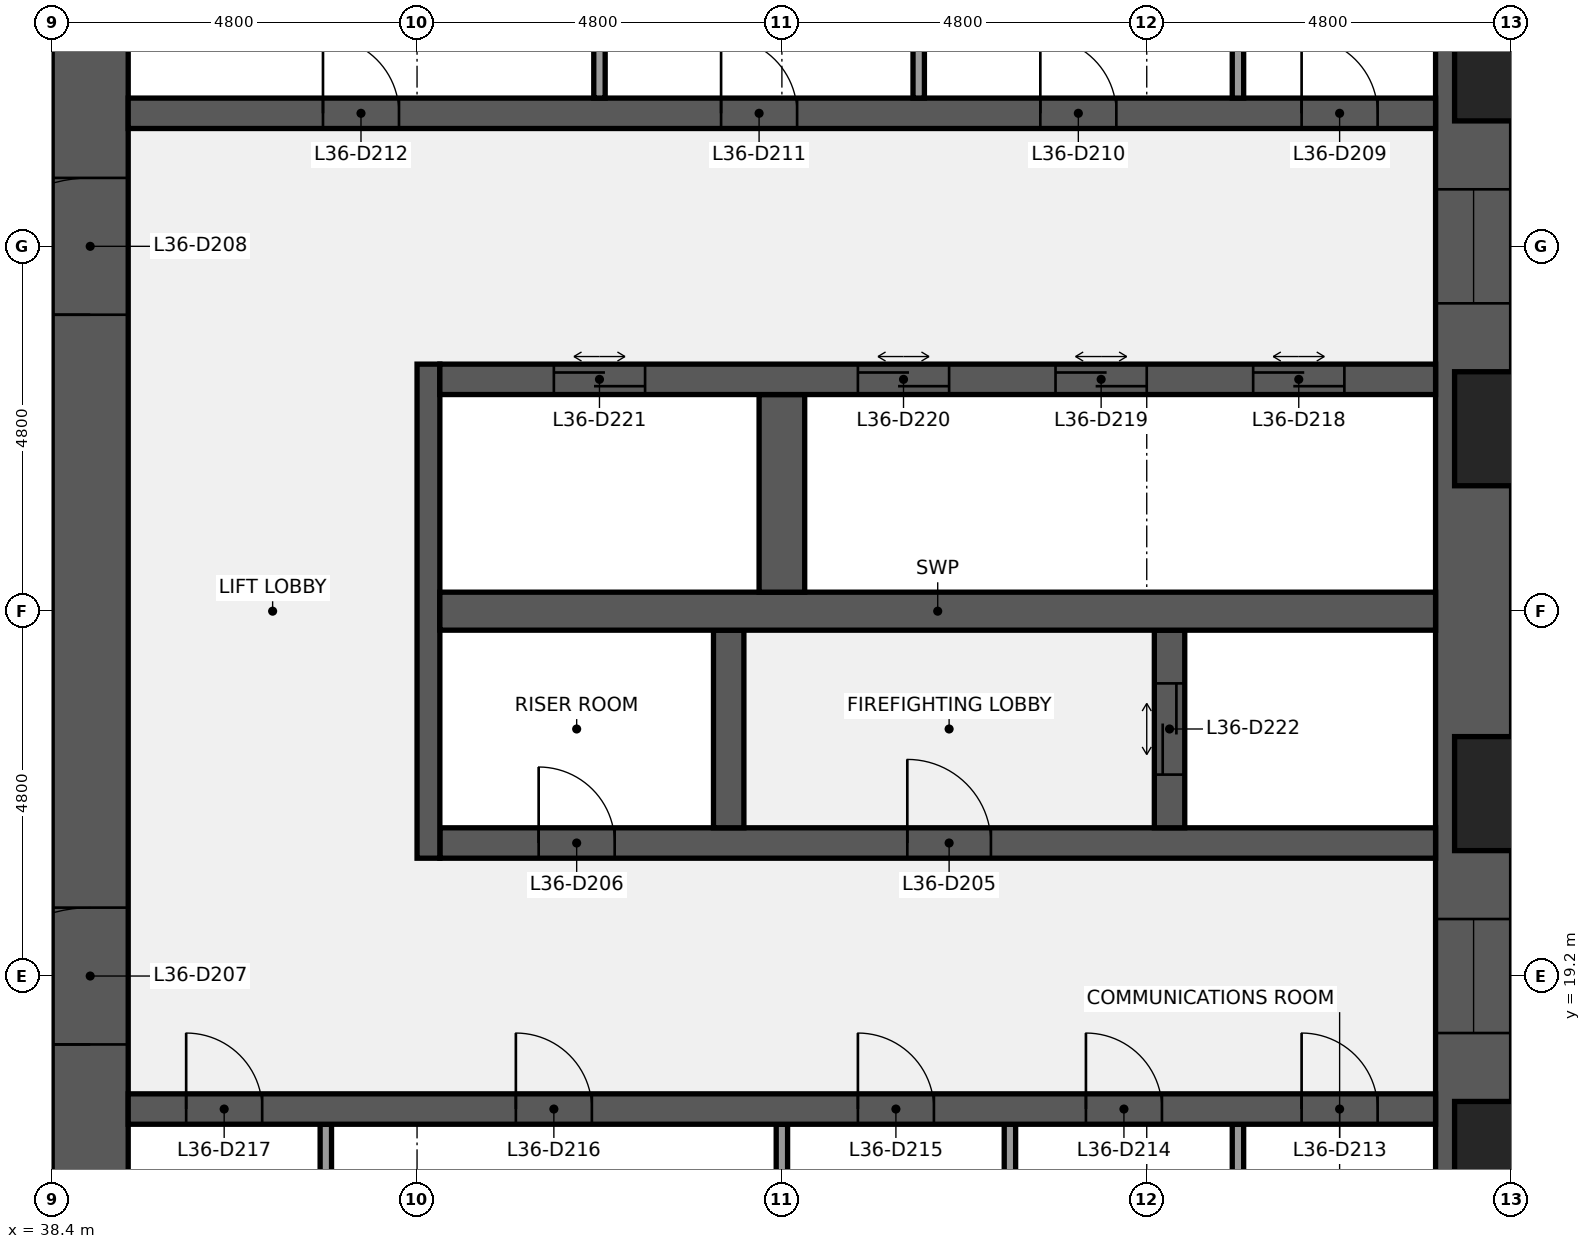
"""IFC4 building model, lengths in metres.
Left out: names, types, materials, properties, quantities, classifications, styles, units other than length and angle.
Written with IfcOpenShell. Run it as: python <this file> out.ifc"""

import sys

from ifc_helpers import new_model, si_unit, direction, frame, frame_2d, origin, place, context, subcontext, project, spatial, rectangle, extrude, element, fill, save


model = new_model("IFC4")
c1 = context("Model", 3, precision=1e-05, world=origin(), true_north=direction((0.0, 1.0)))
c2 = subcontext(c1, "Body", "Model", "MODEL_VIEW")
j1 = project(units=[si_unit("LENGTHUNIT", "METRE"), si_unit("PLANEANGLEUNIT", "RADIAN")], contexts=[c1])
p1 = place(None, origin())
s1 = spatial("IfcSite", under=j1, at=p1, CompositionType="ELEMENT")
p2 = place(p1, origin())
s2 = spatial("IfcBuilding", under=s1, at=p2, CompositionType="ELEMENT")
p3 = place(p2, frame((0.0, 0.0, 164.1)))
s3 = spatial("IfcBuildingStorey", under=s2, at=p3, CompositionType="ELEMENT", Elevation=164.1)
p4 = place(p3, frame((57.1, 38.4, 0.0), z_axis=(0.0, 0.0, 1.0), x_axis=(0.0, -1.0, 0.0)))
e1 = element("IfcWall", 1, at=p4, inside=s3, PredefinedType="SHEAR", context=c2, shape_type="SweptSolid", body=[
    extrude(rectangle(XDim=28.8, YDim=1.0, at=frame_2d((14.4, 0.0))), origin(), (0.0, 0.0, 1.0), 3.84),
])
p5 = place(p4, frame((18.45, 0.0, 0.9)))
e2 = element("IfcOpeningElement", 2, at=p5, cuts=e1, PredefinedType="OPENING", context=c2, shape_type="SweptSolid", body=[
    extrude(rectangle(XDim=1.5, YDim=1.5, at=frame_2d((0.75, 0.75))), frame((0.0, 0.51, 0.0), z_axis=(0.0, -1.0, 0.0), x_axis=(1.0, 0.0, 0.0)), (0.0, 0.0, 1.0), 1.02),
])
p6 = place(p4, frame((8.85, 0.0, 0.9)))
e3 = element("IfcOpeningElement", 3, at=p6, cuts=e1, PredefinedType="OPENING", context=c2, shape_type="SweptSolid", body=[
    extrude(rectangle(XDim=1.5, YDim=1.5, at=frame_2d((0.75, 0.75))), frame((0.0, 0.51, 0.0), z_axis=(0.0, -1.0, 0.0), x_axis=(1.0, 0.0, 0.0)), (0.0, 0.0, 1.0), 1.02),
])
p7 = place(p3, frame((38.9, 9.6, 0.0), z_axis=(0.0, 0.0, 1.0), x_axis=(0.0, 1.0, 0.0)))
e4 = element("IfcWall", 4, at=p7, inside=s3, PredefinedType="SHEAR", context=c2, shape_type="SweptSolid", body=[
    extrude(rectangle(XDim=28.8, YDim=1.0, at=frame_2d((14.4, 0.0))), origin(), (0.0, 0.0, 1.0), 3.84),
])
p8 = place(p7, frame((8.7, 0.0, 0.0)))
e5 = element("IfcOpeningElement", 5, at=p8, cuts=e4, PredefinedType="OPENING", context=c2, shape_type="SweptSolid", body=[
    extrude(rectangle(XDim=1.8, YDim=2.1, at=frame_2d((0.9, 1.05))), frame((0.0, 0.51, 0.0), z_axis=(0.0, -1.0, 0.0), x_axis=(1.0, 0.0, 0.0)), (0.0, 0.0, 1.0), 1.02),
])
p9 = place(p7, frame((18.3, 0.0, 0.0)))
e6 = element("IfcOpeningElement", 6, at=p9, cuts=e4, PredefinedType="OPENING", context=c2, shape_type="SweptSolid", body=[
    extrude(rectangle(XDim=1.8, YDim=2.1, at=frame_2d((0.9, 1.05))), frame((0.0, 0.51, 0.0), z_axis=(0.0, -1.0, 0.0), x_axis=(1.0, 0.0, 0.0)), (0.0, 0.0, 1.0), 1.02),
])
for number, where, z_axis, x_axis in (
    (7, (54.0, 14.65, 0.0), (0.0, 0.0, 1.0), (0.0, 1.0, 0.0)),
    (8, (51.0, 14.65, 0.0), (0.0, 0.0, 1.0), (0.0, 1.0, 0.0)),
    (9, (48.0, 14.65, 0.0), (0.0, 0.0, 1.0), (0.0, 1.0, 0.0)),
    (10, (42.0, 14.65, 0.0), (0.0, 0.0, 1.0), (0.0, 1.0, 0.0)),
):
    element("IfcWall", number, at=place(p3, frame(where, z_axis=z_axis, x_axis=x_axis)), inside=s3, PredefinedType="PARTITIONING", context=c2, shape_type="SweptSolid", body=[
        extrude(rectangle(XDim=2.6, YDim=0.15, at=frame_2d((1.3, 0.0))), origin(), (0.0, 0.0, 1.0), 3.84),
    ])
p10 = place(p3, frame((39.4, 17.45, 0.0), z_axis=(0.0, 0.0, 1.0), x_axis=(1.0, 0.0, 0.0)))
e11 = element("IfcWall", 11, at=p10, inside=s3, PredefinedType="SHEAR", context=c2, shape_type="SweptSolid", body=[
    extrude(rectangle(XDim=17.2, YDim=0.4, at=frame_2d((8.6, 0.0))), origin(), (0.0, 0.0, 1.0), 3.84),
])
p11 = place(p10, frame((15.438, 0.0, 0.0)))
e12 = element("IfcOpeningElement", 12, at=p11, cuts=e11, PredefinedType="OPENING", context=c2, shape_type="SweptSolid", body=[
    extrude(rectangle(XDim=1.0, YDim=2.1, at=frame_2d((0.5, 1.05))), frame((0.0, 0.21, 0.0), z_axis=(0.0, -1.0, 0.0), x_axis=(1.0, 0.0, 0.0)), (0.0, 0.0, 1.0), 0.42),
])
p12 = place(p10, frame((12.6, 0.0, 0.0)))
e13 = element("IfcOpeningElement", 13, at=p12, cuts=e11, PredefinedType="OPENING", context=c2, shape_type="SweptSolid", body=[
    extrude(rectangle(XDim=1.0, YDim=2.1, at=frame_2d((0.5, 1.05))), frame((0.0, 0.21, 0.0), z_axis=(0.0, -1.0, 0.0), x_axis=(1.0, 0.0, 0.0)), (0.0, 0.0, 1.0), 0.42),
])
p13 = place(p10, frame((9.6, 0.0, 0.0)))
e14 = element("IfcOpeningElement", 14, at=p13, cuts=e11, PredefinedType="OPENING", context=c2, shape_type="SweptSolid", body=[
    extrude(rectangle(XDim=1.0, YDim=2.1, at=frame_2d((0.5, 1.05))), frame((0.0, 0.21, 0.0), z_axis=(0.0, -1.0, 0.0), x_axis=(1.0, 0.0, 0.0)), (0.0, 0.0, 1.0), 0.42),
])
p14 = place(p10, frame((5.1, 0.0, 0.0)))
e15 = element("IfcOpeningElement", 15, at=p14, cuts=e11, PredefinedType="OPENING", context=c2, shape_type="SweptSolid", body=[
    extrude(rectangle(XDim=1.0, YDim=2.1, at=frame_2d((0.5, 1.05))), frame((0.0, 0.21, 0.0), z_axis=(0.0, -1.0, 0.0), x_axis=(1.0, 0.0, 0.0)), (0.0, 0.0, 1.0), 0.42),
])
p15 = place(p10, frame((0.762, 0.0, 0.0)))
e16 = element("IfcOpeningElement", 16, at=p15, cuts=e11, PredefinedType="OPENING", context=c2, shape_type="SweptSolid", body=[
    extrude(rectangle(XDim=1.0, YDim=2.1, at=frame_2d((0.5, 1.05))), frame((0.0, 0.21, 0.0), z_axis=(0.0, -1.0, 0.0), x_axis=(1.0, 0.0, 0.0)), (0.0, 0.0, 1.0), 0.42),
])
p16 = place(p3, frame((43.5, 20.95, 0.0), z_axis=(0.0, 0.0, 1.0), x_axis=(1.0, 0.0, 0.0)))
e17 = element("IfcWall", 17, at=p16, inside=s3, PredefinedType="SHEAR", context=c2, shape_type="SweptSolid", body=[
    extrude(rectangle(XDim=13.1, YDim=0.4, at=frame_2d((6.55, 0.0))), origin(), (0.0, 0.0, 1.0), 3.84),
])
p17 = place(p16, frame((6.15, 0.0, 0.0)))
e18 = element("IfcOpeningElement", 18, at=p17, cuts=e17, PredefinedType="OPENING", context=c2, shape_type="SweptSolid", body=[
    extrude(rectangle(XDim=1.1, YDim=2.1, at=frame_2d((0.55, 1.05))), frame((0.0, 0.21, 0.0), z_axis=(0.0, -1.0, 0.0), x_axis=(1.0, 0.0, 0.0)), (0.0, 0.0, 1.0), 0.42),
])
p18 = place(p16, frame((1.3, 0.0, 0.0)))
e19 = element("IfcOpeningElement", 19, at=p18, cuts=e17, PredefinedType="OPENING", context=c2, shape_type="SweptSolid", body=[
    extrude(rectangle(XDim=1.0, YDim=2.1, at=frame_2d((0.5, 1.05))), frame((0.0, 0.21, 0.0), z_axis=(0.0, -1.0, 0.0), x_axis=(1.0, 0.0, 0.0)), (0.0, 0.0, 1.0), 0.42),
])
p19 = place(p3, frame((43.35, 20.75, 0.0), z_axis=(0.0, 0.0, 1.0), x_axis=(0.0, 1.0, 0.0)))
e20 = element("IfcWall", 20, at=p19, inside=s3, PredefinedType="SHEAR", context=c2, shape_type="SweptSolid", body=[
    extrude(rectangle(XDim=6.5, YDim=0.3, at=frame_2d((3.25, 0.0))), origin(), (0.0, 0.0, 1.0), 3.84),
])
p20 = place(p3, frame((53.1, 21.15, 0.0), z_axis=(0.0, 0.0, 1.0), x_axis=(0.0, 1.0, 0.0)))
e21 = element("IfcWall", 21, at=p20, inside=s3, PredefinedType="SHEAR", context=c2, shape_type="SweptSolid", body=[
    extrude(rectangle(XDim=2.6, YDim=0.4, at=frame_2d((1.3, 0.0))), origin(), (0.0, 0.0, 1.0), 3.84),
])
p21 = place(p20, frame((0.7, 0.0, 0.0)))
e22 = element("IfcOpeningElement", 22, at=p21, cuts=e21, PredefinedType="OPENING", context=c2, shape_type="SweptSolid", body=[
    extrude(rectangle(XDim=1.2, YDim=2.1, at=frame_2d((0.6, 1.05))), frame((0.0, 0.21, 0.0), z_axis=(0.0, -1.0, 0.0), x_axis=(1.0, 0.0, 0.0)), (0.0, 0.0, 1.0), 0.42),
])
p22 = place(p3, frame((47.3, 21.15, 0.0), z_axis=(0.0, 0.0, 1.0), x_axis=(0.0, 1.0, 0.0)))
e23 = element("IfcWall", 23, at=p22, inside=s3, PredefinedType="SHEAR", context=c2, shape_type="SweptSolid", body=[
    extrude(rectangle(XDim=2.6, YDim=0.4, at=frame_2d((1.3, 0.0))), origin(), (0.0, 0.0, 1.0), 3.84),
])
p23 = place(p3, frame((43.5, 24.0, 0.0), z_axis=(0.0, 0.0, 1.0), x_axis=(1.0, 0.0, 0.0)))
e24 = element("IfcWall", 24, at=p23, inside=s3, PredefinedType="SHEAR", context=c2, shape_type="SweptSolid", body=[
    extrude(rectangle(XDim=13.1, YDim=0.5, at=frame_2d((6.55, 0.0))), origin(), (0.0, 0.0, 1.0), 3.84),
])
p24 = place(p3, frame((48.0, 24.25, 0.0), z_axis=(0.0, 0.0, 1.0), x_axis=(0.0, 1.0, 0.0)))
e25 = element("IfcWall", 25, at=p24, inside=s3, PredefinedType="SHEAR", context=c2, shape_type="SweptSolid", body=[
    extrude(rectangle(XDim=2.6, YDim=0.6, at=frame_2d((1.3, 0.0))), origin(), (0.0, 0.0, 1.0), 3.84),
])
p25 = place(p3, frame((43.5, 27.05, 0.0), z_axis=(0.0, 0.0, 1.0), x_axis=(1.0, 0.0, 0.0)))
e26 = element("IfcWall", 26, at=p25, inside=s3, PredefinedType="SHEAR", context=c2, shape_type="SweptSolid", body=[
    extrude(rectangle(XDim=13.1, YDim=0.4, at=frame_2d((6.55, 0.0))), origin(), (0.0, 0.0, 1.0), 3.84),
])
p26 = place(p25, frame((10.7, 0.0, 0.0)))
e27 = element("IfcOpeningElement", 27, at=p26, cuts=e26, PredefinedType="OPENING", context=c2, shape_type="SweptSolid", body=[
    extrude(rectangle(XDim=1.2, YDim=2.1, at=frame_2d((0.6, 1.05))), frame((0.0, 0.21, 0.0), z_axis=(0.0, -1.0, 0.0), x_axis=(1.0, 0.0, 0.0)), (0.0, 0.0, 1.0), 0.42),
])
p27 = place(p25, frame((8.1, 0.0, 0.0)))
e28 = element("IfcOpeningElement", 28, at=p27, cuts=e26, PredefinedType="OPENING", context=c2, shape_type="SweptSolid", body=[
    extrude(rectangle(XDim=1.2, YDim=2.1, at=frame_2d((0.6, 1.05))), frame((0.0, 0.21, 0.0), z_axis=(0.0, -1.0, 0.0), x_axis=(1.0, 0.0, 0.0)), (0.0, 0.0, 1.0), 0.42),
])
p28 = place(p25, frame((5.5, 0.0, 0.0)))
e29 = element("IfcOpeningElement", 29, at=p28, cuts=e26, PredefinedType="OPENING", context=c2, shape_type="SweptSolid", body=[
    extrude(rectangle(XDim=1.2, YDim=2.1, at=frame_2d((0.6, 1.05))), frame((0.0, 0.21, 0.0), z_axis=(0.0, -1.0, 0.0), x_axis=(1.0, 0.0, 0.0)), (0.0, 0.0, 1.0), 0.42),
])
p29 = place(p25, frame((1.5, 0.0, 0.0)))
e30 = element("IfcOpeningElement", 30, at=p29, cuts=e26, PredefinedType="OPENING", context=c2, shape_type="SweptSolid", body=[
    extrude(rectangle(XDim=1.2, YDim=2.1, at=frame_2d((0.6, 1.05))), frame((0.0, 0.21, 0.0), z_axis=(0.0, -1.0, 0.0), x_axis=(1.0, 0.0, 0.0)), (0.0, 0.0, 1.0), 0.42),
])
p30 = place(p3, frame((39.4, 30.55, 0.0), z_axis=(0.0, 0.0, 1.0), x_axis=(1.0, 0.0, 0.0)))
e31 = element("IfcWall", 31, at=p30, inside=s3, PredefinedType="SHEAR", context=c2, shape_type="SweptSolid", body=[
    extrude(rectangle(XDim=17.2, YDim=0.4, at=frame_2d((8.6, 0.0))), origin(), (0.0, 0.0, 1.0), 3.84),
])
p31 = place(p30, frame((15.438, 0.0, 0.0)))
e32 = element("IfcOpeningElement", 32, at=p31, cuts=e31, PredefinedType="OPENING", context=c2, shape_type="SweptSolid", body=[
    extrude(rectangle(XDim=1.0, YDim=2.1, at=frame_2d((0.5, 1.05))), frame((0.0, 0.21, 0.0), z_axis=(0.0, -1.0, 0.0), x_axis=(1.0, 0.0, 0.0)), (0.0, 0.0, 1.0), 0.42),
])
p32 = place(p30, frame((12.0, 0.0, 0.0)))
e33 = element("IfcOpeningElement", 33, at=p32, cuts=e31, PredefinedType="OPENING", context=c2, shape_type="SweptSolid", body=[
    extrude(rectangle(XDim=1.0, YDim=2.1, at=frame_2d((0.5, 1.05))), frame((0.0, 0.21, 0.0), z_axis=(0.0, -1.0, 0.0), x_axis=(1.0, 0.0, 0.0)), (0.0, 0.0, 1.0), 0.42),
])
p33 = place(p30, frame((7.8, 0.0, 0.0)))
e34 = element("IfcOpeningElement", 34, at=p33, cuts=e31, PredefinedType="OPENING", context=c2, shape_type="SweptSolid", body=[
    extrude(rectangle(XDim=1.0, YDim=2.1, at=frame_2d((0.5, 1.05))), frame((0.0, 0.21, 0.0), z_axis=(0.0, -1.0, 0.0), x_axis=(1.0, 0.0, 0.0)), (0.0, 0.0, 1.0), 0.42),
])
p34 = place(p30, frame((2.562, 0.0, 0.0)))
e35 = element("IfcOpeningElement", 35, at=p34, cuts=e31, PredefinedType="OPENING", context=c2, shape_type="SweptSolid", body=[
    extrude(rectangle(XDim=1.0, YDim=2.1, at=frame_2d((0.5, 1.05))), frame((0.0, 0.21, 0.0), z_axis=(0.0, -1.0, 0.0), x_axis=(1.0, 0.0, 0.0)), (0.0, 0.0, 1.0), 0.42),
])
for number, where, z_axis, x_axis in (
    (36, (54.0, 30.75, 0.0), (0.0, 0.0, 1.0), (0.0, 1.0, 0.0)),
    (37, (49.8, 30.75, 0.0), (0.0, 0.0, 1.0), (0.0, 1.0, 0.0)),
    (38, (45.6, 30.75, 0.0), (0.0, 0.0, 1.0), (0.0, 1.0, 0.0)),
):
    element("IfcWall", number, at=place(p3, frame(where, z_axis=z_axis, x_axis=x_axis)), inside=s3, PredefinedType="PARTITIONING", context=c2, shape_type="SweptSolid", body=[
        extrude(rectangle(XDim=2.6, YDim=0.15, at=frame_2d((1.3, 0.0))), origin(), (0.0, 0.0, 1.0), 3.84),
    ])
p35 = place(p17, origin())
e39 = element("IfcDoor", 39, at=p35, inside=s3, OperationType="SINGLE_SWING_LEFT", PredefinedType="DOOR", context=c2, shape_type="SweptSolid", body=[
    extrude(rectangle(XDim=1.1, YDim=2.1, at=frame_2d((0.55, 1.05))), frame((0.0, 0.025, 0.0), z_axis=(0.0, -1.0, 0.0), x_axis=(1.0, 0.0, 0.0)), (0.0, 0.0, 1.0), 0.05),
])
fill(e18, e39)
p36 = place(p18, origin())
e40 = element("IfcDoor", 40, at=p36, inside=s3, OperationType="SINGLE_SWING_LEFT", PredefinedType="DOOR", context=c2, shape_type="SweptSolid", body=[
    extrude(rectangle(XDim=1.0, YDim=2.1, at=frame_2d((0.5, 1.05))), frame((0.0, 0.025, 0.0), z_axis=(0.0, -1.0, 0.0), x_axis=(1.0, 0.0, 0.0)), (0.0, 0.0, 1.0), 0.05),
])
fill(e19, e40)
p37 = place(p8, origin())
e41 = element("IfcDoor", 41, at=p37, inside=s3, OperationType="DOUBLE_DOOR_SINGLE_SWING", PredefinedType="DOOR", context=c2, shape_type="SweptSolid", body=[
    extrude(rectangle(XDim=1.8, YDim=2.1, at=frame_2d((0.9, 1.05))), frame((0.0, 0.025, 0.0), z_axis=(0.0, -1.0, 0.0), x_axis=(1.0, 0.0, 0.0)), (0.0, 0.0, 1.0), 0.05),
])
fill(e5, e41)
p38 = place(p9, origin())
e42 = element("IfcDoor", 42, at=p38, inside=s3, OperationType="DOUBLE_DOOR_SINGLE_SWING", PredefinedType="DOOR", context=c2, shape_type="SweptSolid", body=[
    extrude(rectangle(XDim=1.8, YDim=2.1, at=frame_2d((0.9, 1.05))), frame((0.0, 0.025, 0.0), z_axis=(0.0, -1.0, 0.0), x_axis=(1.0, 0.0, 0.0)), (0.0, 0.0, 1.0), 0.05),
])
fill(e6, e42)
p39 = place(p31, origin())
e43 = element("IfcDoor", 43, at=p39, inside=s3, OperationType="SINGLE_SWING_LEFT", PredefinedType="DOOR", context=c2, shape_type="SweptSolid", body=[
    extrude(rectangle(XDim=1.0, YDim=2.1, at=frame_2d((0.5, 1.05))), frame((0.0, 0.025, 0.0), z_axis=(0.0, -1.0, 0.0), x_axis=(1.0, 0.0, 0.0)), (0.0, 0.0, 1.0), 0.05),
])
fill(e32, e43)
p40 = place(p32, origin())
e44 = element("IfcDoor", 44, at=p40, inside=s3, OperationType="SINGLE_SWING_LEFT", PredefinedType="DOOR", context=c2, shape_type="SweptSolid", body=[
    extrude(rectangle(XDim=1.0, YDim=2.1, at=frame_2d((0.5, 1.05))), frame((0.0, 0.025, 0.0), z_axis=(0.0, -1.0, 0.0), x_axis=(1.0, 0.0, 0.0)), (0.0, 0.0, 1.0), 0.05),
])
fill(e33, e44)
p41 = place(p33, origin())
e45 = element("IfcDoor", 45, at=p41, inside=s3, OperationType="SINGLE_SWING_LEFT", PredefinedType="DOOR", context=c2, shape_type="SweptSolid", body=[
    extrude(rectangle(XDim=1.0, YDim=2.1, at=frame_2d((0.5, 1.05))), frame((0.0, 0.025, 0.0), z_axis=(0.0, -1.0, 0.0), x_axis=(1.0, 0.0, 0.0)), (0.0, 0.0, 1.0), 0.05),
])
fill(e34, e45)
p42 = place(p34, origin())
e46 = element("IfcDoor", 46, at=p42, inside=s3, OperationType="SINGLE_SWING_LEFT", PredefinedType="DOOR", context=c2, shape_type="SweptSolid", body=[
    extrude(rectangle(XDim=1.0, YDim=2.1, at=frame_2d((0.5, 1.05))), frame((0.0, 0.025, 0.0), z_axis=(0.0, -1.0, 0.0), x_axis=(1.0, 0.0, 0.0)), (0.0, 0.0, 1.0), 0.05),
])
fill(e35, e46)
p43 = place(p11, origin())
e47 = element("IfcDoor", 47, at=p43, inside=s3, OperationType="SINGLE_SWING_LEFT", PredefinedType="DOOR", context=c2, shape_type="SweptSolid", body=[
    extrude(rectangle(XDim=1.0, YDim=2.1, at=frame_2d((0.5, 1.05))), frame((0.0, 0.025, 0.0), z_axis=(0.0, -1.0, 0.0), x_axis=(1.0, 0.0, 0.0)), (0.0, 0.0, 1.0), 0.05),
])
fill(e12, e47)
p44 = place(p12, origin())
e48 = element("IfcDoor", 48, at=p44, inside=s3, OperationType="SINGLE_SWING_LEFT", PredefinedType="DOOR", context=c2, shape_type="SweptSolid", body=[
    extrude(rectangle(XDim=1.0, YDim=2.1, at=frame_2d((0.5, 1.05))), frame((0.0, 0.025, 0.0), z_axis=(0.0, -1.0, 0.0), x_axis=(1.0, 0.0, 0.0)), (0.0, 0.0, 1.0), 0.05),
])
fill(e13, e48)
p45 = place(p13, origin())
e49 = element("IfcDoor", 49, at=p45, inside=s3, OperationType="SINGLE_SWING_LEFT", PredefinedType="DOOR", context=c2, shape_type="SweptSolid", body=[
    extrude(rectangle(XDim=1.0, YDim=2.1, at=frame_2d((0.5, 1.05))), frame((0.0, 0.025, 0.0), z_axis=(0.0, -1.0, 0.0), x_axis=(1.0, 0.0, 0.0)), (0.0, 0.0, 1.0), 0.05),
])
fill(e14, e49)
p46 = place(p14, origin())
e50 = element("IfcDoor", 50, at=p46, inside=s3, OperationType="SINGLE_SWING_LEFT", PredefinedType="DOOR", context=c2, shape_type="SweptSolid", body=[
    extrude(rectangle(XDim=1.0, YDim=2.1, at=frame_2d((0.5, 1.05))), frame((0.0, 0.025, 0.0), z_axis=(0.0, -1.0, 0.0), x_axis=(1.0, 0.0, 0.0)), (0.0, 0.0, 1.0), 0.05),
])
fill(e15, e50)
p47 = place(p15, origin())
e51 = element("IfcDoor", 51, at=p47, inside=s3, OperationType="SINGLE_SWING_LEFT", PredefinedType="DOOR", context=c2, shape_type="SweptSolid", body=[
    extrude(rectangle(XDim=1.0, YDim=2.1, at=frame_2d((0.5, 1.05))), frame((0.0, 0.025, 0.0), z_axis=(0.0, -1.0, 0.0), x_axis=(1.0, 0.0, 0.0)), (0.0, 0.0, 1.0), 0.05),
])
fill(e16, e51)
p48 = place(p26, origin())
e52 = element("IfcDoor", 52, at=p48, inside=s3, OperationType="DOUBLE_DOOR_SLIDING", PredefinedType="DOOR", context=c2, shape_type="SweptSolid", body=[
    extrude(rectangle(XDim=1.2, YDim=2.1, at=frame_2d((0.6, 1.05))), frame((0.0, 0.025, 0.0), z_axis=(0.0, -1.0, 0.0), x_axis=(1.0, 0.0, 0.0)), (0.0, 0.0, 1.0), 0.05),
])
fill(e27, e52)
p49 = place(p27, origin())
e53 = element("IfcDoor", 53, at=p49, inside=s3, OperationType="DOUBLE_DOOR_SLIDING", PredefinedType="DOOR", context=c2, shape_type="SweptSolid", body=[
    extrude(rectangle(XDim=1.2, YDim=2.1, at=frame_2d((0.6, 1.05))), frame((0.0, 0.025, 0.0), z_axis=(0.0, -1.0, 0.0), x_axis=(1.0, 0.0, 0.0)), (0.0, 0.0, 1.0), 0.05),
])
fill(e28, e53)
p50 = place(p28, origin())
e54 = element("IfcDoor", 54, at=p50, inside=s3, OperationType="DOUBLE_DOOR_SLIDING", PredefinedType="DOOR", context=c2, shape_type="SweptSolid", body=[
    extrude(rectangle(XDim=1.2, YDim=2.1, at=frame_2d((0.6, 1.05))), frame((0.0, 0.025, 0.0), z_axis=(0.0, -1.0, 0.0), x_axis=(1.0, 0.0, 0.0)), (0.0, 0.0, 1.0), 0.05),
])
fill(e29, e54)
p51 = place(p29, origin())
e55 = element("IfcDoor", 55, at=p51, inside=s3, OperationType="DOUBLE_DOOR_SLIDING", PredefinedType="DOOR", context=c2, shape_type="SweptSolid", body=[
    extrude(rectangle(XDim=1.2, YDim=2.1, at=frame_2d((0.6, 1.05))), frame((0.0, 0.025, 0.0), z_axis=(0.0, -1.0, 0.0), x_axis=(1.0, 0.0, 0.0)), (0.0, 0.0, 1.0), 0.05),
])
fill(e30, e55)
p52 = place(p21, origin())
e56 = element("IfcDoor", 56, at=p52, inside=s3, OperationType="DOUBLE_DOOR_SLIDING", PredefinedType="DOOR", context=c2, shape_type="SweptSolid", body=[
    extrude(rectangle(XDim=1.2, YDim=2.1, at=frame_2d((0.6, 1.05))), frame((0.0, 0.025, 0.0), z_axis=(0.0, -1.0, 0.0), x_axis=(1.0, 0.0, 0.0)), (0.0, 0.0, 1.0), 0.05),
])
fill(e22, e56)
p53 = place(p5, origin())
e57 = element("IfcWindow", 57, at=p53, inside=s3, PartitioningType="SINGLE_PANEL", PredefinedType="WINDOW", context=c2, shape_type="SweptSolid", body=[
    extrude(rectangle(XDim=1.5, YDim=1.5, at=frame_2d((0.75, 0.75))), frame((0.0, 0.03, 0.0), z_axis=(0.0, -1.0, 0.0), x_axis=(1.0, 0.0, 0.0)), (0.0, 0.0, 1.0), 0.06),
])
fill(e2, e57)
p54 = place(p6, origin())
e58 = element("IfcWindow", 58, at=p54, inside=s3, PartitioningType="SINGLE_PANEL", PredefinedType="WINDOW", context=c2, shape_type="SweptSolid", body=[
    extrude(rectangle(XDim=1.5, YDim=1.5, at=frame_2d((0.75, 0.75))), frame((0.0, 0.03, 0.0), z_axis=(0.0, -1.0, 0.0), x_axis=(1.0, 0.0, 0.0)), (0.0, 0.0, 1.0), 0.06),
])
fill(e3, e58)
save(model, sys.argv[1])
